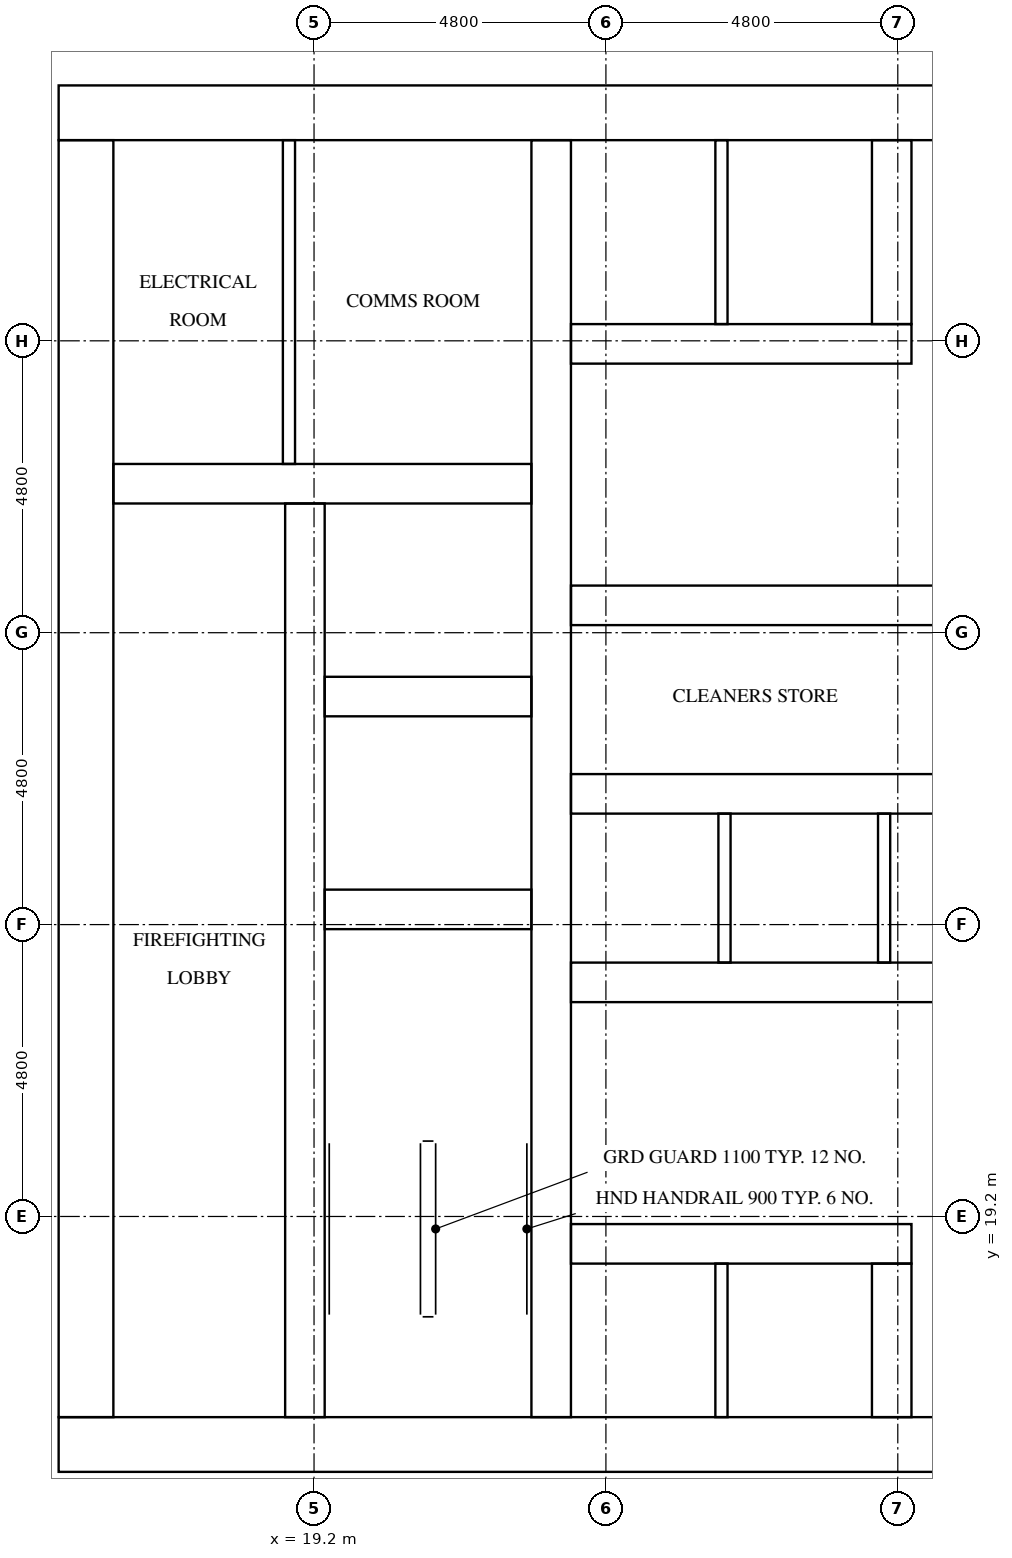
"""IFC4 building model, lengths in metres.
Left out: names, types, materials, properties, quantities, classifications, styles, units other than length and angle.
Written with IfcOpenShell. Run it as: python <this file> out.ifc"""

import sys

from ifc_helpers import new_model, si_unit, direction, frame, frame_2d, origin, place, context, subcontext, project, spatial, rectangle, extrude, element, fill, save


model = new_model("IFC4")
c1 = context("Model", 3, precision=1e-05, world=origin(), true_north=direction((0.0, 1.0)))
c2 = subcontext(c1, "Body", "Model", "MODEL_VIEW")
j1 = project(units=[si_unit("LENGTHUNIT", "METRE"), si_unit("PLANEANGLEUNIT", "RADIAN")], contexts=[c1])
p1 = place(None, origin())
s1 = spatial("IfcSite", under=j1, at=p1, CompositionType="ELEMENT")
p2 = place(p1, origin())
s2 = spatial("IfcBuilding", under=s1, at=p2, CompositionType="ELEMENT")
p3 = place(p2, frame((0.0, 0.0, 66.3)))
s3 = spatial("IfcBuildingStorey", under=s2, at=p3, CompositionType="ELEMENT", Elevation=66.3)
p4 = place(p3, frame((15.0, 15.45, 0.0), z_axis=(0.0, 0.0, 1.0), x_axis=(1.0, 0.0, 0.0)))
e1 = element("IfcWall", 1, at=p4, inside=s3, PredefinedType="SHEAR", context=c2, shape_type="SweptSolid", body=[
    extrude(rectangle(XDim=32.4, YDim=0.9, at=frame_2d((16.2, 0.0))), origin(), (0.0, 0.0, 1.0), 3.2),
])
p5 = place(p4, frame((15.3, 0.0, 0.0)))
e2 = element("IfcOpeningElement", 2, at=p5, cuts=e1, PredefinedType="OPENING", context=c2, shape_type="SweptSolid", body=[
    extrude(rectangle(XDim=1.8, YDim=2.1, at=frame_2d((0.9, 1.05))), frame((0.0, 0.46, 0.0), z_axis=(0.0, -1.0, 0.0), x_axis=(1.0, 0.0, 0.0)), (0.0, 0.0, 1.0), 0.92),
])
p6 = place(p3, frame((15.0, 37.35, 0.0), z_axis=(0.0, 0.0, 1.0), x_axis=(1.0, 0.0, 0.0)))
e3 = element("IfcWall", 3, at=p6, inside=s3, PredefinedType="SHEAR", context=c2, shape_type="SweptSolid", body=[
    extrude(rectangle(XDim=32.4, YDim=0.9, at=frame_2d((16.2, 0.0))), origin(), (0.0, 0.0, 1.0), 3.2),
])
p7 = place(p6, frame((15.3, 0.0, 0.0)))
e4 = element("IfcOpeningElement", 4, at=p7, cuts=e3, PredefinedType="OPENING", context=c2, shape_type="SweptSolid", body=[
    extrude(rectangle(XDim=1.8, YDim=2.1, at=frame_2d((0.9, 1.05))), frame((0.0, 0.46, 0.0), z_axis=(0.0, -1.0, 0.0), x_axis=(1.0, 0.0, 0.0)), (0.0, 0.0, 1.0), 0.92),
])
p8 = place(p6, frame((1.794, 0.0, 0.0)))
e5 = element("IfcOpeningElement", 5, at=p8, cuts=e3, PredefinedType="OPENING", context=c2, shape_type="SweptSolid", body=[
    extrude(rectangle(XDim=1.0, YDim=2.1, at=frame_2d((0.5, 1.05))), frame((0.0, 0.46, 0.0), z_axis=(0.0, -1.0, 0.0), x_axis=(1.0, 0.0, 0.0)), (0.0, 0.0, 1.0), 0.92),
])
p9 = place(p6, frame((5.331, 0.0, 0.0)))
e6 = element("IfcOpeningElement", 6, at=p9, cuts=e3, PredefinedType="OPENING", context=c2, shape_type="SweptSolid", body=[
    extrude(rectangle(XDim=1.0, YDim=2.1, at=frame_2d((0.5, 1.05))), frame((0.0, 0.46, 0.0), z_axis=(0.0, -1.0, 0.0), x_axis=(1.0, 0.0, 0.0)), (0.0, 0.0, 1.0), 0.92),
])
p10 = place(p3, frame((15.45, 15.9, 0.0), z_axis=(0.0, 0.0, 1.0), x_axis=(0.0, 1.0, 0.0)))
e7 = element("IfcWall", 7, at=p10, inside=s3, PredefinedType="SHEAR", context=c2, shape_type="SweptSolid", body=[
    extrude(rectangle(XDim=21.0, YDim=0.9, at=frame_2d((10.5, 0.0))), origin(), (0.0, 0.0, 1.0), 3.2),
])
p11 = place(p10, frame((4.86, 0.0, 0.0)))
e8 = element("IfcOpeningElement", 8, at=p11, cuts=e7, PredefinedType="OPENING", context=c2, shape_type="SweptSolid", body=[
    extrude(rectangle(XDim=1.2, YDim=2.1, at=frame_2d((0.6, 1.05))), frame((0.0, 0.46, 0.0), z_axis=(0.0, -1.0, 0.0), x_axis=(1.0, 0.0, 0.0)), (0.0, 0.0, 1.0), 0.92),
])
p12 = place(p3, frame((19.05, 15.9, 0.0), z_axis=(0.0, 0.0, 1.0), x_axis=(0.0, 1.0, 0.0)))
e9 = element("IfcWall", 9, at=p12, inside=s3, PredefinedType="SHEAR", context=c2, shape_type="SweptSolid", body=[
    extrude(rectangle(XDim=15.025, YDim=0.65, at=frame_2d((7.513, 0.0))), origin(), (0.0, 0.0, 1.0), 3.2),
])
p13 = place(p12, frame((9.55, 0.0, 0.0)))
e10 = element("IfcOpeningElement", 10, at=p13, cuts=e9, PredefinedType="OPENING", context=c2, shape_type="SweptSolid", body=[
    extrude(rectangle(XDim=1.1, YDim=2.1, at=frame_2d((0.55, 1.05))), frame((0.0, 0.335, 0.0), z_axis=(0.0, -1.0, 0.0), x_axis=(1.0, 0.0, 0.0)), (0.0, 0.0, 1.0), 0.67),
])
p14 = place(p12, frame((13.05, 0.0, 0.0)))
e11 = element("IfcOpeningElement", 11, at=p14, cuts=e9, PredefinedType="OPENING", context=c2, shape_type="SweptSolid", body=[
    extrude(rectangle(XDim=1.1, YDim=2.1, at=frame_2d((0.55, 1.05))), frame((0.0, 0.335, 0.0), z_axis=(0.0, -1.0, 0.0), x_axis=(1.0, 0.0, 0.0)), (0.0, 0.0, 1.0), 0.67),
])
p15 = place(p12, frame((0.3, 0.0, 0.0)))
e12 = element("IfcOpeningElement", 12, at=p15, cuts=e9, PredefinedType="OPENING", context=c2, shape_type="SweptSolid", body=[
    extrude(rectangle(XDim=1.2, YDim=2.1, at=frame_2d((0.6, 1.05))), frame((0.0, 0.335, 0.0), z_axis=(0.0, -1.0, 0.0), x_axis=(1.0, 0.0, 0.0)), (0.0, 0.0, 1.0), 0.67),
])
p16 = place(p3, frame((23.1, 15.9, 0.0), z_axis=(0.0, 0.0, 1.0), x_axis=(0.0, 1.0, 0.0)))
e13 = element("IfcWall", 13, at=p16, inside=s3, PredefinedType="SHEAR", context=c2, shape_type="SweptSolid", body=[
    extrude(rectangle(XDim=21.0, YDim=0.65, at=frame_2d((10.5, 0.0))), origin(), (0.0, 0.0, 1.0), 3.2),
])
for number, where, z_axis, x_axis in (
    (14, (19.375, 24.25, 0.0), (0.0, 0.0, 1.0), (1.0, 0.0, 0.0)),
    (15, (19.375, 27.75, 0.0), (0.0, 0.0, 1.0), (1.0, 0.0, 0.0)),
):
    element("IfcWall", number, at=place(p3, frame(where, z_axis=z_axis, x_axis=x_axis)), inside=s3, PredefinedType="SHEAR", context=c2, shape_type="SweptSolid", body=[
        extrude(rectangle(XDim=3.4, YDim=0.65, at=frame_2d((1.7, 0.0))), origin(), (0.0, 0.0, 1.0), 3.2),
    ])
p17 = place(p3, frame((15.9, 31.25, 0.0), z_axis=(0.0, 0.0, 1.0), x_axis=(1.0, 0.0, 0.0)))
e16 = element("IfcWall", 16, at=p17, inside=s3, PredefinedType="SHEAR", context=c2, shape_type="SweptSolid", body=[
    extrude(rectangle(XDim=6.875, YDim=0.65, at=frame_2d((3.438, 0.0))), origin(), (0.0, 0.0, 1.0), 3.2),
])
p18 = place(p3, frame((23.425, 18.75, 0.0), z_axis=(0.0, 0.0, 1.0), x_axis=(1.0, 0.0, 0.0)))
e17 = element("IfcWall", 17, at=p18, inside=s3, PredefinedType="SHEAR", context=c2, shape_type="SweptSolid", body=[
    extrude(rectangle(XDim=5.6, YDim=0.65, at=frame_2d((2.8, 0.0))), origin(), (0.0, 0.0, 1.0), 3.2),
])
p19 = place(p18, frame((0.637, 0.0, 0.0)))
e18 = element("IfcOpeningElement", 18, at=p19, cuts=e17, PredefinedType="OPENING", context=c2, shape_type="SweptSolid", body=[
    extrude(rectangle(XDim=1.1, YDim=2.1, at=frame_2d((0.55, 1.05))), frame((0.0, 0.335, 0.0), z_axis=(0.0, -1.0, 0.0), x_axis=(1.0, 0.0, 0.0)), (0.0, 0.0, 1.0), 0.67),
])
p20 = place(p18, frame((3.212, 0.0, 0.0)))
e19 = element("IfcOpeningElement", 19, at=p20, cuts=e17, PredefinedType="OPENING", context=c2, shape_type="SweptSolid", body=[
    extrude(rectangle(XDim=1.1, YDim=2.1, at=frame_2d((0.55, 1.05))), frame((0.0, 0.335, 0.0), z_axis=(0.0, -1.0, 0.0), x_axis=(1.0, 0.0, 0.0)), (0.0, 0.0, 1.0), 0.67),
])
p21 = place(p3, frame((23.425, 23.05, 0.0), z_axis=(0.0, 0.0, 1.0), x_axis=(1.0, 0.0, 0.0)))
e20 = element("IfcWall", 20, at=p21, inside=s3, PredefinedType="SHEAR", context=c2, shape_type="SweptSolid", body=[
    extrude(rectangle(XDim=15.55, YDim=0.65, at=frame_2d((7.775, 0.0))), origin(), (0.0, 0.0, 1.0), 3.2),
])
p22 = place(p21, frame((0.663, 0.0, 0.0)))
e21 = element("IfcOpeningElement", 21, at=p22, cuts=e20, PredefinedType="OPENING", context=c2, shape_type="SweptSolid", body=[
    extrude(rectangle(XDim=1.1, YDim=2.1, at=frame_2d((0.55, 1.05))), frame((0.0, 0.335, 0.0), z_axis=(0.0, -1.0, 0.0), x_axis=(1.0, 0.0, 0.0)), (0.0, 0.0, 1.0), 0.67),
])
p23 = place(p21, frame((3.288, 0.0, 0.0)))
e22 = element("IfcOpeningElement", 22, at=p23, cuts=e20, PredefinedType="OPENING", context=c2, shape_type="SweptSolid", body=[
    extrude(rectangle(XDim=1.1, YDim=2.1, at=frame_2d((0.55, 1.05))), frame((0.0, 0.335, 0.0), z_axis=(0.0, -1.0, 0.0), x_axis=(1.0, 0.0, 0.0)), (0.0, 0.0, 1.0), 0.67),
])
p24 = place(p21, frame((10.809, 0.0, 0.0)))
e23 = element("IfcOpeningElement", 23, at=p24, cuts=e20, PredefinedType="OPENING", context=c2, shape_type="SweptSolid", body=[
    extrude(rectangle(XDim=1.0, YDim=2.1, at=frame_2d((0.5, 1.05))), frame((0.0, 0.335, 0.0), z_axis=(0.0, -1.0, 0.0), x_axis=(1.0, 0.0, 0.0)), (0.0, 0.0, 1.0), 0.67),
])
p25 = place(p21, frame((13.434, 0.0, 0.0)))
e24 = element("IfcOpeningElement", 24, at=p25, cuts=e20, PredefinedType="OPENING", context=c2, shape_type="SweptSolid", body=[
    extrude(rectangle(XDim=1.0, YDim=2.1, at=frame_2d((0.5, 1.05))), frame((0.0, 0.335, 0.0), z_axis=(0.0, -1.0, 0.0), x_axis=(1.0, 0.0, 0.0)), (0.0, 0.0, 1.0), 0.67),
])
p26 = place(p3, frame((23.425, 26.15, 0.0), z_axis=(0.0, 0.0, 1.0), x_axis=(1.0, 0.0, 0.0)))
e25 = element("IfcWall", 25, at=p26, inside=s3, PredefinedType="SHEAR", context=c2, shape_type="SweptSolid", body=[
    extrude(rectangle(XDim=15.55, YDim=0.65, at=frame_2d((7.775, 0.0))), origin(), (0.0, 0.0, 1.0), 3.2),
])
p27 = place(p3, frame((23.425, 29.25, 0.0), z_axis=(0.0, 0.0, 1.0), x_axis=(1.0, 0.0, 0.0)))
e26 = element("IfcWall", 26, at=p27, inside=s3, PredefinedType="SHEAR", context=c2, shape_type="SweptSolid", body=[
    extrude(rectangle(XDim=15.55, YDim=0.65, at=frame_2d((7.775, 0.0))), origin(), (0.0, 0.0, 1.0), 3.2),
])
p28 = place(p27, frame((2.508, 0.0, 0.0)))
e27 = element("IfcOpeningElement", 27, at=p28, cuts=e26, PredefinedType="OPENING", context=c2, shape_type="SweptSolid", body=[
    extrude(rectangle(XDim=1.0, YDim=2.1, at=frame_2d((0.5, 1.05))), frame((0.0, 0.335, 0.0), z_axis=(0.0, -1.0, 0.0), x_axis=(1.0, 0.0, 0.0)), (0.0, 0.0, 1.0), 0.67),
])
p29 = place(p27, frame((7.275, 0.0, 0.0)))
e28 = element("IfcOpeningElement", 28, at=p29, cuts=e26, PredefinedType="OPENING", context=c2, shape_type="SweptSolid", body=[
    extrude(rectangle(XDim=1.0, YDim=2.1, at=frame_2d((0.5, 1.05))), frame((0.0, 0.335, 0.0), z_axis=(0.0, -1.0, 0.0), x_axis=(1.0, 0.0, 0.0)), (0.0, 0.0, 1.0), 0.67),
])
p30 = place(p27, frame((12.042, 0.0, 0.0)))
e29 = element("IfcOpeningElement", 29, at=p30, cuts=e26, PredefinedType="OPENING", context=c2, shape_type="SweptSolid", body=[
    extrude(rectangle(XDim=1.0, YDim=2.1, at=frame_2d((0.5, 1.05))), frame((0.0, 0.335, 0.0), z_axis=(0.0, -1.0, 0.0), x_axis=(1.0, 0.0, 0.0)), (0.0, 0.0, 1.0), 0.67),
])
p31 = place(p3, frame((23.425, 33.55, 0.0), z_axis=(0.0, 0.0, 1.0), x_axis=(1.0, 0.0, 0.0)))
e30 = element("IfcWall", 30, at=p31, inside=s3, PredefinedType="SHEAR", context=c2, shape_type="SweptSolid", body=[
    extrude(rectangle(XDim=5.6, YDim=0.65, at=frame_2d((2.8, 0.0))), origin(), (0.0, 0.0, 1.0), 3.2),
])
p32 = place(p3, frame((28.7, 15.9, 0.0), z_axis=(0.0, 0.0, 1.0), x_axis=(0.0, 1.0, 0.0)))
e31 = element("IfcWall", 31, at=p32, inside=s3, PredefinedType="SHEAR", context=c2, shape_type="SweptSolid", body=[
    extrude(rectangle(XDim=2.525, YDim=0.65, at=frame_2d((1.263, 0.0))), origin(), (0.0, 0.0, 1.0), 3.2),
])
p33 = place(p3, frame((28.7, 33.875, 0.0), z_axis=(0.0, 0.0, 1.0), x_axis=(0.0, 1.0, 0.0)))
e32 = element("IfcWall", 32, at=p33, inside=s3, PredefinedType="SHEAR", context=c2, shape_type="SweptSolid", body=[
    extrude(rectangle(XDim=3.025, YDim=0.65, at=frame_2d((1.512, 0.0))), origin(), (0.0, 0.0, 1.0), 3.2),
])
for number, where, z_axis, x_axis in (
    (33, (25.95, 23.375, 0.0), (0.0, 0.0, 1.0), (0.0, 1.0, 0.0)),
    (34, (28.575, 23.375, 0.0), (0.0, 0.0, 1.0), (0.0, 1.0, 0.0)),
):
    element("IfcWall", number, at=place(p3, frame(where, z_axis=z_axis, x_axis=x_axis)), inside=s3, PredefinedType="SOLIDWALL", context=c2, shape_type="SweptSolid", body=[
        extrude(rectangle(XDim=2.45, YDim=0.2, at=frame_2d((1.225, 0.0))), origin(), (0.0, 0.0, 1.0), 3.2),
    ])
p34 = place(p3, frame((25.9, 15.9, 0.0), z_axis=(0.0, 0.0, 1.0), x_axis=(0.0, 1.0, 0.0)))
e35 = element("IfcWall", 35, at=p34, inside=s3, PredefinedType="SOLIDWALL", context=c2, shape_type="SweptSolid", body=[
    extrude(rectangle(XDim=2.525, YDim=0.2, at=frame_2d((1.263, 0.0))), origin(), (0.0, 0.0, 1.0), 3.2),
])
p35 = place(p3, frame((25.9, 33.875, 0.0), z_axis=(0.0, 0.0, 1.0), x_axis=(0.0, 1.0, 0.0)))
e36 = element("IfcWall", 36, at=p35, inside=s3, PredefinedType="SOLIDWALL", context=c2, shape_type="SweptSolid", body=[
    extrude(rectangle(XDim=3.025, YDim=0.2, at=frame_2d((1.512, 0.0))), origin(), (0.0, 0.0, 1.0), 3.2),
])
p36 = place(p3, frame((18.788, 31.575, 0.0), z_axis=(0.0, 0.0, 1.0), x_axis=(0.0, 1.0, 0.0)))
e37 = element("IfcWall", 37, at=p36, inside=s3, PredefinedType="PARTITIONING", context=c2, shape_type="SweptSolid", body=[
    extrude(rectangle(XDim=5.325, YDim=0.2, at=frame_2d((2.663, 0.0))), origin(), (0.0, 0.0, 1.0), 3.2),
])
p37 = place(p19, origin())
e38 = element("IfcDoor", 38, at=p37, inside=s3, OperationType="DOUBLE_DOOR_SLIDING", PredefinedType="DOOR", context=c2, shape_type="SweptSolid", body=[
    extrude(rectangle(XDim=1.1, YDim=2.1, at=frame_2d((0.55, 1.05))), frame((0.0, 0.025, 0.0), z_axis=(0.0, -1.0, 0.0), x_axis=(1.0, 0.0, 0.0)), (0.0, 0.0, 1.0), 0.05),
])
fill(e18, e38)
p38 = place(p20, origin())
e39 = element("IfcDoor", 39, at=p38, inside=s3, OperationType="DOUBLE_DOOR_SLIDING", PredefinedType="DOOR", context=c2, shape_type="SweptSolid", body=[
    extrude(rectangle(XDim=1.1, YDim=2.1, at=frame_2d((0.55, 1.05))), frame((0.0, 0.025, 0.0), z_axis=(0.0, -1.0, 0.0), x_axis=(1.0, 0.0, 0.0)), (0.0, 0.0, 1.0), 0.05),
])
fill(e19, e39)
p39 = place(p22, origin())
e40 = element("IfcDoor", 40, at=p39, inside=s3, OperationType="DOUBLE_DOOR_SLIDING", PredefinedType="DOOR", context=c2, shape_type="SweptSolid", body=[
    extrude(rectangle(XDim=1.1, YDim=2.1, at=frame_2d((0.55, 1.05))), frame((0.0, 0.025, 0.0), z_axis=(0.0, -1.0, 0.0), x_axis=(1.0, 0.0, 0.0)), (0.0, 0.0, 1.0), 0.05),
])
fill(e21, e40)
p40 = place(p23, origin())
e41 = element("IfcDoor", 41, at=p40, inside=s3, OperationType="DOUBLE_DOOR_SLIDING", PredefinedType="DOOR", context=c2, shape_type="SweptSolid", body=[
    extrude(rectangle(XDim=1.1, YDim=2.1, at=frame_2d((0.55, 1.05))), frame((0.0, 0.025, 0.0), z_axis=(0.0, -1.0, 0.0), x_axis=(1.0, 0.0, 0.0)), (0.0, 0.0, 1.0), 0.05),
])
fill(e22, e41)
p41 = place(p13, origin())
e42 = element("IfcDoor", 42, at=p41, inside=s3, OperationType="DOUBLE_DOOR_SLIDING", PredefinedType="DOOR", context=c2, shape_type="SweptSolid", body=[
    extrude(rectangle(XDim=1.1, YDim=2.1, at=frame_2d((0.55, 1.05))), frame((0.0, 0.025, 0.0), z_axis=(0.0, -1.0, 0.0), x_axis=(1.0, 0.0, 0.0)), (0.0, 0.0, 1.0), 0.05),
])
fill(e10, e42)
p42 = place(p14, origin())
e43 = element("IfcDoor", 43, at=p42, inside=s3, OperationType="DOUBLE_DOOR_SLIDING", PredefinedType="DOOR", context=c2, shape_type="SweptSolid", body=[
    extrude(rectangle(XDim=1.1, YDim=2.1, at=frame_2d((0.55, 1.05))), frame((0.0, 0.025, 0.0), z_axis=(0.0, -1.0, 0.0), x_axis=(1.0, 0.0, 0.0)), (0.0, 0.0, 1.0), 0.05),
])
fill(e11, e43)
p43 = place(p15, frame((1.2, 0.0, 0.0), z_axis=(0.0, 0.0, 1.0), x_axis=(-1.0, 0.0, 0.0)))
e44 = element("IfcDoor", 44, at=p43, inside=s3, OperationType="SINGLE_SWING_RIGHT", PredefinedType="DOOR", context=c2, shape_type="SweptSolid", body=[
    extrude(rectangle(XDim=1.2, YDim=2.1, at=frame_2d((0.6, 1.05))), frame((0.0, 0.025, 0.0), z_axis=(0.0, -1.0, 0.0), x_axis=(1.0, 0.0, 0.0)), (0.0, 0.0, 1.0), 0.05),
])
fill(e12, e44)
p44 = place(p11, frame((1.2, 0.0, 0.0), z_axis=(0.0, 0.0, 1.0), x_axis=(-1.0, 0.0, 0.0)))
e45 = element("IfcDoor", 45, at=p44, inside=s3, OperationType="SINGLE_SWING_LEFT", PredefinedType="DOOR", context=c2, shape_type="SweptSolid", body=[
    extrude(rectangle(XDim=1.2, YDim=2.1, at=frame_2d((0.6, 1.05))), frame((0.0, 0.025, 0.0), z_axis=(0.0, -1.0, 0.0), x_axis=(1.0, 0.0, 0.0)), (0.0, 0.0, 1.0), 0.05),
])
fill(e8, e45)
p45 = place(p8, origin())
e46 = element("IfcDoor", 46, at=p45, inside=s3, OperationType="SINGLE_SWING_LEFT", PredefinedType="DOOR", context=c2, shape_type="SweptSolid", body=[
    extrude(rectangle(XDim=1.0, YDim=2.1, at=frame_2d((0.5, 1.05))), frame((0.0, 0.025, 0.0), z_axis=(0.0, -1.0, 0.0), x_axis=(1.0, 0.0, 0.0)), (0.0, 0.0, 1.0), 0.05),
])
fill(e5, e46)
p46 = place(p9, origin())
e47 = element("IfcDoor", 47, at=p46, inside=s3, OperationType="SINGLE_SWING_RIGHT", PredefinedType="DOOR", context=c2, shape_type="SweptSolid", body=[
    extrude(rectangle(XDim=1.0, YDim=2.1, at=frame_2d((0.5, 1.05))), frame((0.0, 0.025, 0.0), z_axis=(0.0, -1.0, 0.0), x_axis=(1.0, 0.0, 0.0)), (0.0, 0.0, 1.0), 0.05),
])
fill(e6, e47)
p47 = place(p28, origin())
e48 = element("IfcDoor", 48, at=p47, inside=s3, OperationType="SINGLE_SWING_LEFT", PredefinedType="DOOR", context=c2, shape_type="SweptSolid", body=[
    extrude(rectangle(XDim=1.0, YDim=2.1, at=frame_2d((0.5, 1.05))), frame((0.0, 0.025, 0.0), z_axis=(0.0, -1.0, 0.0), x_axis=(1.0, 0.0, 0.0)), (0.0, 0.0, 1.0), 0.05),
])
fill(e27, e48)
save(model, sys.argv[1])
